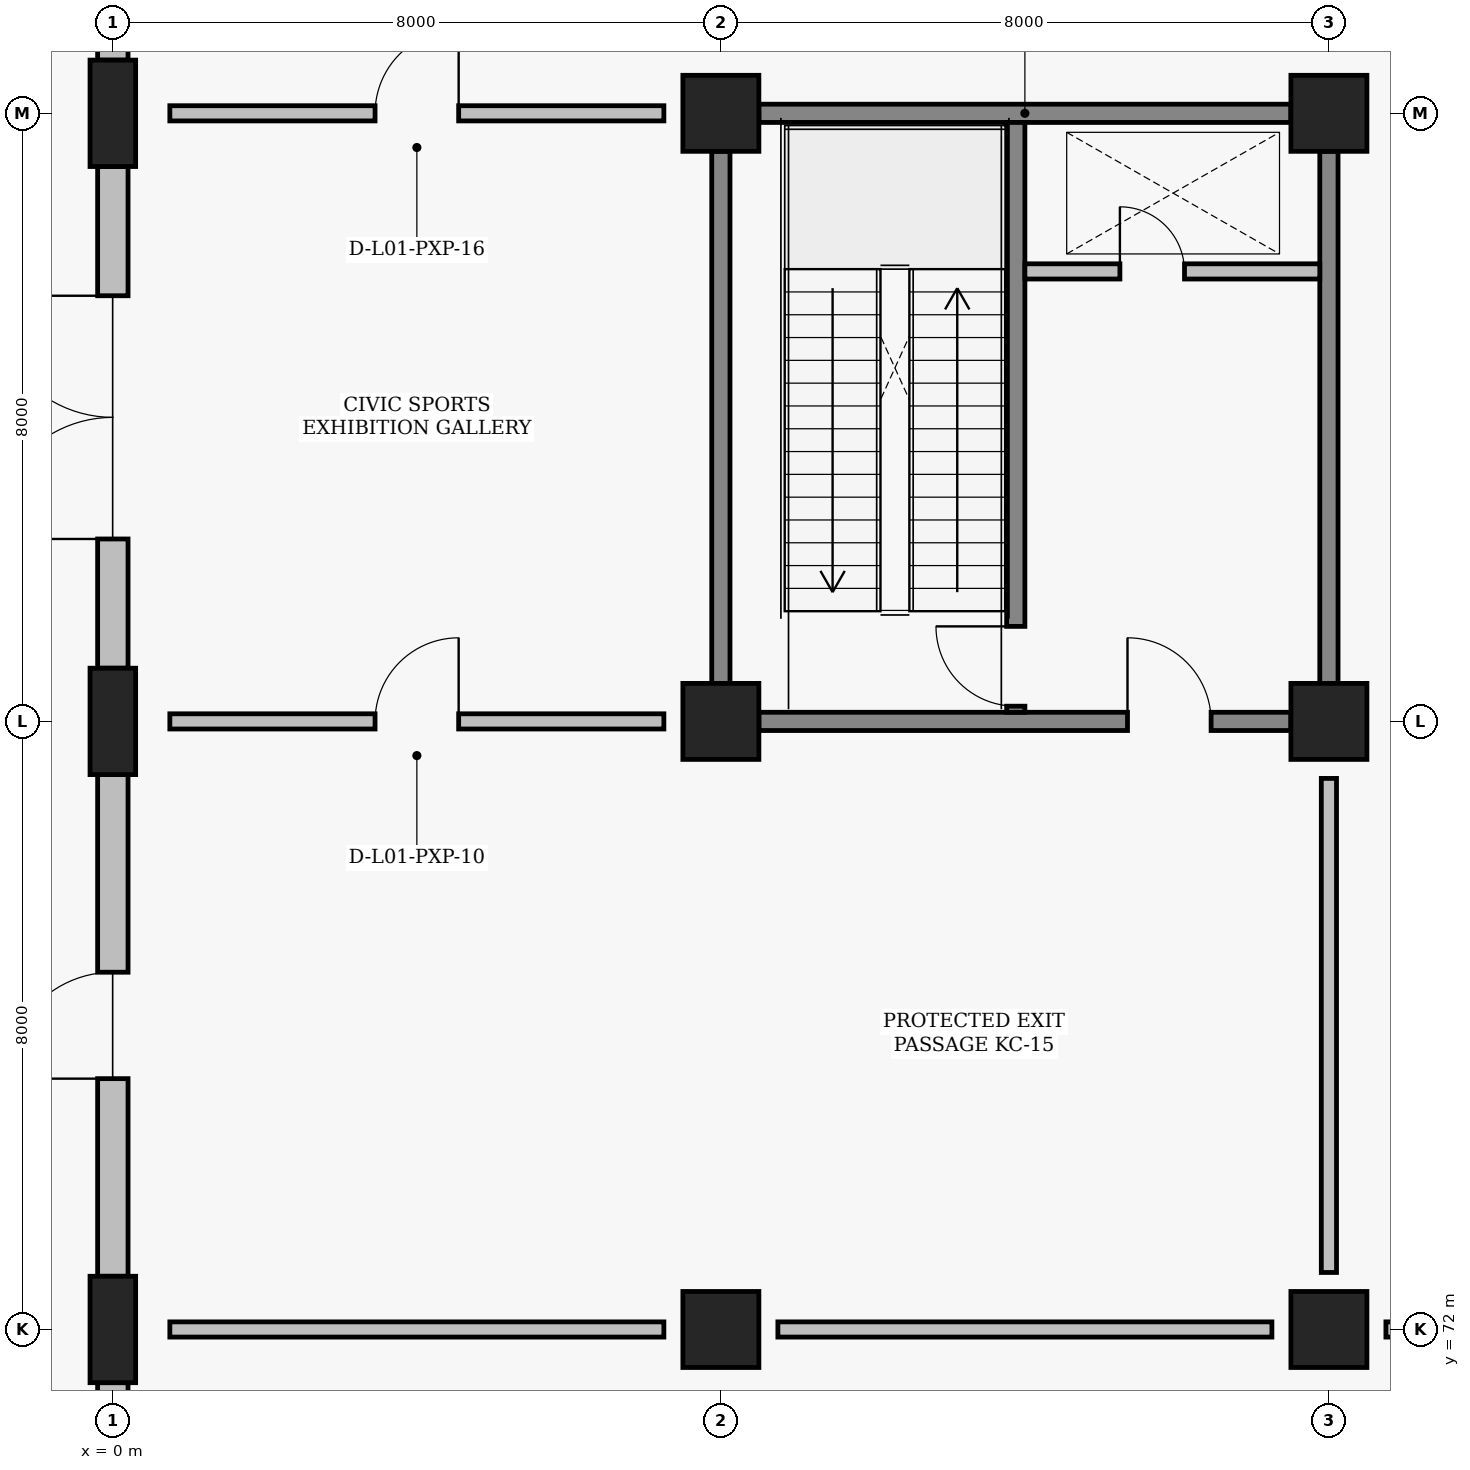
"""IFC4 building model, lengths in metres.
Left out: names, types, materials, properties, quantities, classifications, styles, units other than length and angle.
Written with IfcOpenShell. Run it as: python <this file> out.ifc"""

import sys

from ifc_helpers import new_model, si_unit, direction, frame, frame_2d, origin, origin_2d, place, context, subcontext, project, spatial, rectangle, circle, extrude, element, fill, save


model = new_model("IFC4")
c1 = context("Model", 3, precision=1e-05, world=origin(), true_north=direction((0.0, 1.0)))
c2 = subcontext(c1, "Body", "Model", "MODEL_VIEW")
j1 = project(units=[si_unit("LENGTHUNIT", "METRE"), si_unit("PLANEANGLEUNIT", "RADIAN")], contexts=[c1])
p1 = place(None, origin())
s1 = spatial("IfcSite", under=j1, at=p1, CompositionType="ELEMENT")
p2 = place(p1, origin())
s2 = spatial("IfcBuilding", under=s1, at=p2, CompositionType="ELEMENT")
p3 = place(p2, origin())
s3 = spatial("IfcBuildingStorey", under=s2, at=p3, CompositionType="ELEMENT", Elevation=0.0)
for number, where, z_axis, x_axis in (
    (1, (0.0, 72.0, 0.0), (0.0, 0.0, 1.0), (1.0, 0.0, 0.0)),
    (2, (0.0, 80.0, 0.0), (0.0, 0.0, 1.0), (1.0, 0.0, 0.0)),
    (3, (0.0, 88.0, 0.0), (0.0, 0.0, 1.0), (1.0, 0.0, 0.0)),
):
    element("IfcColumn", number, at=place(p3, frame(where, z_axis=z_axis, x_axis=x_axis)), inside=s3, PredefinedType="PILASTER", context=c2, shape_type="SweptSolid", body=[
        extrude(rectangle(XDim=0.6, YDim=1.4, at=origin_2d()), origin(), (0.0, 0.0, 1.0), 4.8),
    ])
for number, where, z_axis, x_axis in (
    (4, (8.0, 72.0, 0.0), (0.0, 0.0, 1.0), (1.0, 0.0, 0.0)),
    (5, (8.0, 80.0, 0.0), (0.0, 0.0, 1.0), (1.0, 0.0, 0.0)),
    (6, (8.0, 88.0, 0.0), (0.0, 0.0, 1.0), (1.0, 0.0, 0.0)),
    (7, (16.0, 72.0, 0.0), (0.0, 0.0, 1.0), (1.0, 0.0, 0.0)),
    (8, (16.0, 80.0, 0.0), (0.0, 0.0, 1.0), (1.0, 0.0, 0.0)),
    (9, (16.0, 88.0, 0.0), (0.0, 0.0, 1.0), (1.0, 0.0, 0.0)),
):
    element("IfcColumn", number, at=place(p3, frame(where, z_axis=z_axis, x_axis=x_axis)), inside=s3, PredefinedType="COLUMN", context=c2, shape_type="SweptSolid", body=[
        extrude(circle(Radius=0.5, at=origin_2d()), origin(), (0.0, 0.0, 1.0), 4.8),
    ])
p4 = place(p3, frame((0.0, 64.7, 0.0), z_axis=(0.0, 0.0, 1.0), x_axis=(0.0, 1.0, 0.0)))
e10 = element("IfcWall", 10, at=p4, inside=s3, PredefinedType="SOLIDWALL", context=c2, shape_type="SweptSolid", body=[
    extrude(rectangle(XDim=6.6, YDim=0.4, at=frame_2d((3.3, 0.0))), origin(), (0.0, 0.0, 1.0), 3.91),
])
p5 = place(p4, frame((2.6, 0.0, 0.0)))
e11 = element("IfcOpeningElement", 11, at=p5, cuts=e10, PredefinedType="OPENING", context=c2, shape_type="SweptSolid", body=[
    extrude(rectangle(XDim=1.4, YDim=2.2, at=frame_2d((0.7, 1.1))), frame((0.0, 0.21, 0.0), z_axis=(0.0, -1.0, 0.0), x_axis=(1.0, 0.0, 0.0)), (0.0, 0.0, 1.0), 0.42),
])
p6 = place(p3, frame((0.0, 72.7, 0.0), z_axis=(0.0, 0.0, 1.0), x_axis=(0.0, 1.0, 0.0)))
e12 = element("IfcWall", 12, at=p6, inside=s3, PredefinedType="SOLIDWALL", context=c2, shape_type="SweptSolid", body=[
    extrude(rectangle(XDim=6.6, YDim=0.4, at=frame_2d((3.3, 0.0))), origin(), (0.0, 0.0, 1.0), 3.66),
])
p7 = place(p6, frame((2.6, 0.0, 0.0)))
e13 = element("IfcOpeningElement", 13, at=p7, cuts=e12, PredefinedType="OPENING", context=c2, shape_type="SweptSolid", body=[
    extrude(rectangle(XDim=1.4, YDim=2.2, at=frame_2d((0.7, 1.1))), frame((0.0, 0.21, 0.0), z_axis=(0.0, -1.0, 0.0), x_axis=(1.0, 0.0, 0.0)), (0.0, 0.0, 1.0), 0.42),
])
p8 = place(p3, frame((0.0, 80.7, 0.0), z_axis=(0.0, 0.0, 1.0), x_axis=(0.0, 1.0, 0.0)))
e14 = element("IfcWall", 14, at=p8, inside=s3, PredefinedType="SOLIDWALL", context=c2, shape_type="SweptSolid", body=[
    extrude(rectangle(XDim=6.6, YDim=0.4, at=frame_2d((3.3, 0.0))), origin(), (0.0, 0.0, 1.0), 3.66),
])
p9 = place(p8, frame((1.7, 0.0, 0.0)))
e15 = element("IfcOpeningElement", 15, at=p9, cuts=e14, PredefinedType="OPENING", context=c2, shape_type="SweptSolid", body=[
    extrude(rectangle(XDim=3.2, YDim=2.7, at=frame_2d((1.6, 1.35))), frame((0.0, 0.21, 0.0), z_axis=(0.0, -1.0, 0.0), x_axis=(1.0, 0.0, 0.0)), (0.0, 0.0, 1.0), 0.42),
])
p10 = place(p3, frame((0.0, 88.7, 0.0), z_axis=(0.0, 0.0, 1.0), x_axis=(0.0, 1.0, 0.0)))
e16 = element("IfcWall", 16, at=p10, inside=s3, PredefinedType="SOLIDWALL", context=c2, shape_type="SweptSolid", body=[
    extrude(rectangle(XDim=6.6, YDim=0.4, at=frame_2d((3.3, 0.0))), origin(), (0.0, 0.0, 1.0), 3.91),
])
p11 = place(p10, frame((2.6, 0.0, 0.0)))
e17 = element("IfcOpeningElement", 17, at=p11, cuts=e16, PredefinedType="OPENING", context=c2, shape_type="SweptSolid", body=[
    extrude(rectangle(XDim=1.4, YDim=2.2, at=frame_2d((0.7, 1.1))), frame((0.0, 0.21, 0.0), z_axis=(0.0, -1.0, 0.0), x_axis=(1.0, 0.0, 0.0)), (0.0, 0.0, 1.0), 0.42),
])
p12 = place(p3, frame((8.5, 80.0, 0.0), z_axis=(0.0, 0.0, 1.0), x_axis=(1.0, 0.0, 0.0)))
e18 = element("IfcWall", 18, at=p12, inside=s3, PredefinedType="SHEAR", context=c2, shape_type="SweptSolid", body=[
    extrude(rectangle(XDim=7.0, YDim=0.24, at=frame_2d((3.5, 0.0))), origin(), (0.0, 0.0, 1.0), 3.66),
])
p13 = place(p12, frame((4.85, 0.0, 0.0)))
e19 = element("IfcOpeningElement", 19, at=p13, cuts=e18, PredefinedType="OPENING", context=c2, shape_type="SweptSolid", body=[
    extrude(rectangle(XDim=1.1, YDim=2.2, at=frame_2d((0.55, 1.1))), frame((0.0, 0.13, 0.0), z_axis=(0.0, -1.0, 0.0), x_axis=(1.0, 0.0, 0.0)), (0.0, 0.0, 1.0), 0.26),
])
p14 = place(p3, frame((8.5, 88.0, 0.0), z_axis=(0.0, 0.0, 1.0), x_axis=(1.0, 0.0, 0.0)))
e20 = element("IfcWall", 20, at=p14, inside=s3, PredefinedType="SHEAR", context=c2, shape_type="SweptSolid", body=[
    extrude(rectangle(XDim=7.0, YDim=0.24, at=frame_2d((3.5, 0.0))), origin(), (0.0, 0.0, 1.0), 3.81),
])
p15 = place(p3, frame((8.0, 80.5, 0.0), z_axis=(0.0, 0.0, 1.0), x_axis=(0.0, 1.0, 0.0)))
e21 = element("IfcWall", 21, at=p15, inside=s3, PredefinedType="SHEAR", context=c2, shape_type="SweptSolid", body=[
    extrude(rectangle(XDim=7.0, YDim=0.24, at=frame_2d((3.5, 0.0))), origin(), (0.0, 0.0, 1.0), 3.66),
])
p16 = place(p3, frame((16.0, 80.5, 0.0), z_axis=(0.0, 0.0, 1.0), x_axis=(0.0, 1.0, 0.0)))
e22 = element("IfcWall", 22, at=p16, inside=s3, PredefinedType="SHEAR", context=c2, shape_type="SweptSolid", body=[
    extrude(rectangle(XDim=7.0, YDim=0.24, at=frame_2d((3.5, 0.0))), origin(), (0.0, 0.0, 1.0), 3.81),
])
p17 = place(p3, frame((11.88, 80.12, 0.0), z_axis=(0.0, 0.0, 1.0), x_axis=(0.0, 1.0, 0.0)))
e23 = element("IfcWall", 23, at=p17, inside=s3, PredefinedType="SHEAR", context=c2, shape_type="SweptSolid", body=[
    extrude(rectangle(XDim=7.76, YDim=0.24, at=frame_2d((3.88, 0.0))), origin(), (0.0, 0.0, 1.0), 4.01),
])
p18 = place(p17, frame((0.08, 0.0, 0.0)))
e24 = element("IfcOpeningElement", 24, at=p18, cuts=e23, PredefinedType="OPENING", context=c2, shape_type="SweptSolid", body=[
    extrude(rectangle(XDim=1.05, YDim=2.15, at=frame_2d((0.525, 1.075))), frame((0.0, 0.13, 0.0), z_axis=(0.0, -1.0, 0.0), x_axis=(1.0, 0.0, 0.0)), (0.0, 0.0, 1.0), 0.26),
])
p19 = place(p3, frame((12.0, 85.92, 0.0), z_axis=(0.0, 0.0, 1.0), x_axis=(1.0, 0.0, 0.0)))
e25 = element("IfcWall", 25, at=p19, inside=s3, PredefinedType="PARTITIONING", context=c2, shape_type="SweptSolid", body=[
    extrude(rectangle(XDim=3.88, YDim=0.2, at=frame_2d((1.94, 0.0))), origin(), (0.0, 0.0, 1.0), 3.81),
])
p20 = place(p19, frame((1.25, 0.0, 0.0)))
e26 = element("IfcOpeningElement", 26, at=p20, cuts=e25, PredefinedType="OPENING", context=c2, shape_type="SweptSolid", body=[
    extrude(rectangle(XDim=0.85, YDim=2.05, at=frame_2d((0.425, 1.025))), frame((0.0, 0.11, 0.0), z_axis=(0.0, -1.0, 0.0), x_axis=(1.0, 0.0, 0.0)), (0.0, 0.0, 1.0), 0.22),
])
p21 = place(p3, frame((0.75, 72.0, 0.0), z_axis=(0.0, 0.0, 1.0), x_axis=(1.0, 0.0, 0.0)))
e27 = element("IfcWall", 27, at=p21, inside=s3, PredefinedType="PARTITIONING", context=c2, shape_type="SweptSolid", body=[
    extrude(rectangle(XDim=6.5, YDim=0.2, at=frame_2d((3.25, 0.0))), origin(), (0.0, 0.0, 1.0), 3.91),
])
p22 = place(p3, frame((0.75, 80.0, 0.0), z_axis=(0.0, 0.0, 1.0), x_axis=(1.0, 0.0, 0.0)))
e28 = element("IfcWall", 28, at=p22, inside=s3, PredefinedType="PARTITIONING", context=c2, shape_type="SweptSolid", body=[
    extrude(rectangle(XDim=6.5, YDim=0.2, at=frame_2d((3.25, 0.0))), origin(), (0.0, 0.0, 1.0), 3.66),
])
p23 = place(p22, frame((2.7, 0.0, 0.0)))
e29 = element("IfcOpeningElement", 29, at=p23, cuts=e28, PredefinedType="OPENING", context=c2, shape_type="SweptSolid", body=[
    extrude(rectangle(XDim=1.1, YDim=2.2, at=frame_2d((0.55, 1.1))), frame((0.0, 0.11, 0.0), z_axis=(0.0, -1.0, 0.0), x_axis=(1.0, 0.0, 0.0)), (0.0, 0.0, 1.0), 0.22),
])
p24 = place(p3, frame((16.0, 72.75, 0.0), z_axis=(0.0, 0.0, 1.0), x_axis=(0.0, 1.0, 0.0)))
e30 = element("IfcWall", 30, at=p24, inside=s3, PredefinedType="PARTITIONING", context=c2, shape_type="SweptSolid", body=[
    extrude(rectangle(XDim=6.5, YDim=0.2, at=frame_2d((3.25, 0.0))), origin(), (0.0, 0.0, 1.0), 3.81),
])
p25 = place(p3, frame((8.75, 72.0, 0.0), z_axis=(0.0, 0.0, 1.0), x_axis=(1.0, 0.0, 0.0)))
e31 = element("IfcWall", 31, at=p25, inside=s3, PredefinedType="PARTITIONING", context=c2, shape_type="SweptSolid", body=[
    extrude(rectangle(XDim=6.5, YDim=0.2, at=frame_2d((3.25, 0.0))), origin(), (0.0, 0.0, 1.0), 3.66),
])
p26 = place(p3, frame((16.75, 72.0, 0.0), z_axis=(0.0, 0.0, 1.0), x_axis=(1.0, 0.0, 0.0)))
e32 = element("IfcWall", 32, at=p26, inside=s3, PredefinedType="PARTITIONING", context=c2, shape_type="SweptSolid", body=[
    extrude(rectangle(XDim=6.5, YDim=0.2, at=frame_2d((3.25, 0.0))), origin(), (0.0, 0.0, 1.0), 3.91),
])
p27 = place(p3, frame((0.75, 88.0, 0.0), z_axis=(0.0, 0.0, 1.0), x_axis=(1.0, 0.0, 0.0)))
e33 = element("IfcWall", 33, at=p27, inside=s3, PredefinedType="PARTITIONING", context=c2, shape_type="SweptSolid", body=[
    extrude(rectangle(XDim=6.5, YDim=0.2, at=frame_2d((3.25, 0.0))), origin(), (0.0, 0.0, 1.0), 3.91),
])
p28 = place(p27, frame((2.7, 0.0, 0.0)))
e34 = element("IfcOpeningElement", 34, at=p28, cuts=e33, PredefinedType="OPENING", context=c2, shape_type="SweptSolid", body=[
    extrude(rectangle(XDim=1.1, YDim=2.2, at=frame_2d((0.55, 1.1))), frame((0.0, 0.11, 0.0), z_axis=(0.0, -1.0, 0.0), x_axis=(1.0, 0.0, 0.0)), (0.0, 0.0, 1.0), 0.22),
])
p29 = place(p7, origin())
e35 = element("IfcDoor", 35, at=p29, inside=s3, OperationType="SINGLE_SWING_LEFT", PredefinedType="DOOR", context=c2, shape_type="SweptSolid", body=[
    extrude(rectangle(XDim=1.4, YDim=2.2, at=frame_2d((0.7, 1.1))), frame((0.0, 0.025, 0.0), z_axis=(0.0, -1.0, 0.0), x_axis=(1.0, 0.0, 0.0)), (0.0, 0.0, 1.0), 0.05),
])
fill(e13, e35)
p30 = place(p9, origin())
e36 = element("IfcDoor", 36, at=p30, inside=s3, OperationType="DOUBLE_SWING_LEFT", PredefinedType="DOOR", context=c2, shape_type="SweptSolid", body=[
    extrude(rectangle(XDim=3.2, YDim=2.7, at=frame_2d((1.6, 1.35))), frame((0.0, 0.025, 0.0), z_axis=(0.0, -1.0, 0.0), x_axis=(1.0, 0.0, 0.0)), (0.0, 0.0, 1.0), 0.05),
])
fill(e15, e36)
p31 = place(p13, origin())
e37 = element("IfcDoor", 37, at=p31, inside=s3, OperationType="SINGLE_SWING_LEFT", PredefinedType="DOOR", context=c2, shape_type="SweptSolid", body=[
    extrude(rectangle(XDim=1.1, YDim=2.2, at=frame_2d((0.55, 1.1))), frame((0.0, 0.025, 0.0), z_axis=(0.0, -1.0, 0.0), x_axis=(1.0, 0.0, 0.0)), (0.0, 0.0, 1.0), 0.05),
])
fill(e19, e37)
p32 = place(p18, origin())
e38 = element("IfcDoor", 38, at=p32, inside=s3, OperationType="SINGLE_SWING_RIGHT", PredefinedType="DOOR", context=c2, shape_type="SweptSolid", body=[
    extrude(rectangle(XDim=1.05, YDim=2.15, at=frame_2d((0.525, 1.075))), frame((0.0, 0.025, 0.0), z_axis=(0.0, -1.0, 0.0), x_axis=(1.0, 0.0, 0.0)), (0.0, 0.0, 1.0), 0.05),
])
fill(e24, e38)
p33 = place(p20, origin())
e39 = element("IfcDoor", 39, at=p33, inside=s3, OperationType="SINGLE_SWING_LEFT", PredefinedType="TRAPDOOR", context=c2, shape_type="SweptSolid", body=[
    extrude(rectangle(XDim=0.85, YDim=2.05, at=frame_2d((0.425, 1.025))), frame((0.0, 0.025, 0.0), z_axis=(0.0, -1.0, 0.0), x_axis=(1.0, 0.0, 0.0)), (0.0, 0.0, 1.0), 0.05),
])
fill(e26, e39)
p34 = place(p23, origin())
e40 = element("IfcDoor", 40, at=p34, inside=s3, OperationType="SINGLE_SWING_RIGHT", PredefinedType="DOOR", context=c2, shape_type="SweptSolid", body=[
    extrude(rectangle(XDim=1.1, YDim=2.2, at=frame_2d((0.55, 1.1))), frame((0.0, 0.025, 0.0), z_axis=(0.0, -1.0, 0.0), x_axis=(1.0, 0.0, 0.0)), (0.0, 0.0, 1.0), 0.05),
])
fill(e29, e40)
p35 = place(p28, origin())
e41 = element("IfcDoor", 41, at=p35, inside=s3, OperationType="SINGLE_SWING_RIGHT", PredefinedType="DOOR", context=c2, shape_type="SweptSolid", body=[
    extrude(rectangle(XDim=1.1, YDim=2.2, at=frame_2d((0.55, 1.1))), frame((0.0, 0.025, 0.0), z_axis=(0.0, -1.0, 0.0), x_axis=(1.0, 0.0, 0.0)), (0.0, 0.0, 1.0), 0.05),
])
fill(e34, e41)
save(model, sys.argv[1])
